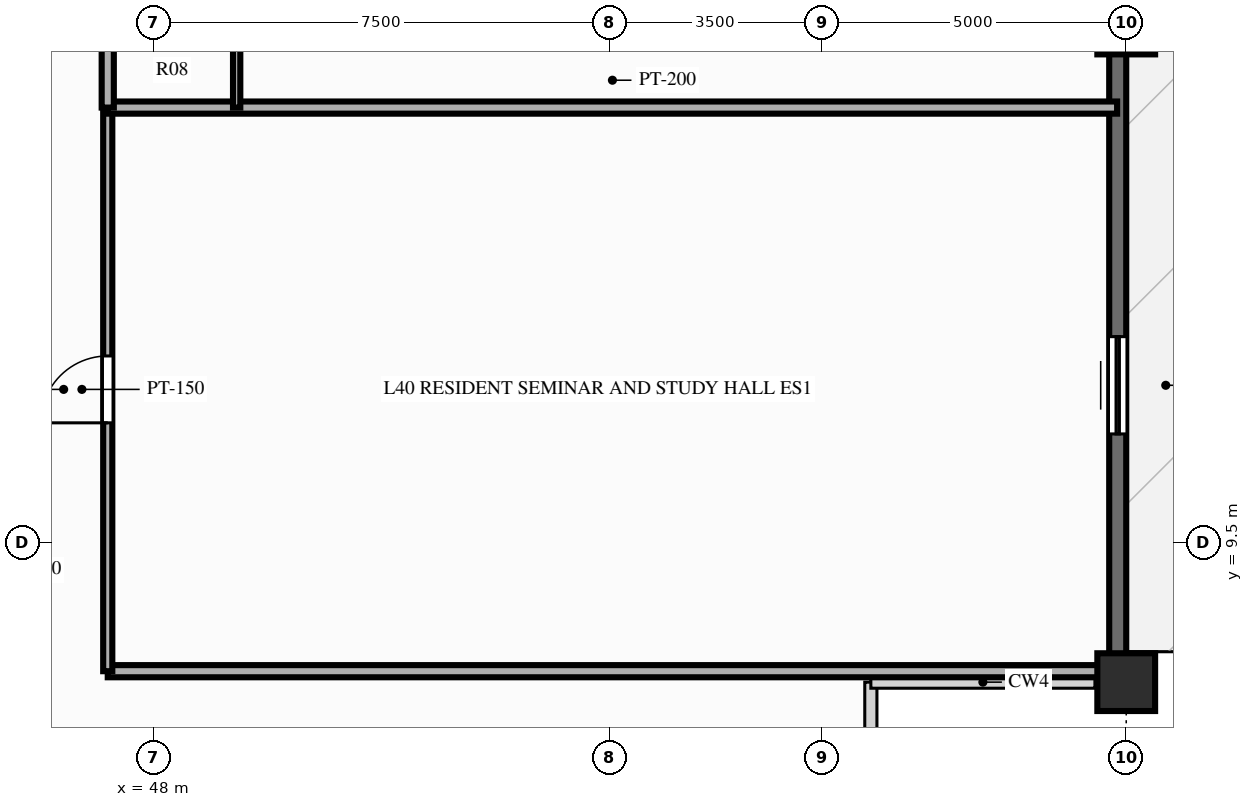
"""IFC4 building model, lengths in metres.
Left out: names, types, materials, properties, quantities, classifications, styles, units other than length and angle.
Written with IfcOpenShell. Run it as: python <this file> out.ifc"""

import sys

from ifc_helpers import new_model, si_unit, direction, frame, frame_2d, origin, origin_2d, place, context, subcontext, project, spatial, rectangle, extrude, source, transform, mapped, element, fill, save


model = new_model("IFC4")
c1 = context("Model", 3, precision=1e-05, world=origin(), true_north=direction((0.0, 1.0)))
c2 = subcontext(c1, "Body", "Model", "MODEL_VIEW")
j1 = project(units=[si_unit("LENGTHUNIT", "METRE"), si_unit("PLANEANGLEUNIT", "RADIAN")], contexts=[c1])
p1 = place(None, origin())
s1 = spatial("IfcSite", under=j1, at=p1, CompositionType="ELEMENT")
p2 = place(p1, origin())
s2 = spatial("IfcBuilding", under=s1, at=p2, CompositionType="ELEMENT")
p3 = place(p2, frame((0.0, 0.0, 126.75)))
s3 = spatial("IfcBuildingStorey", under=s2, at=p3, CompositionType="ELEMENT", Elevation=126.75)
m1 = source(origin(), c2, "Body", "SweptSolid", [
    extrude(rectangle(XDim=0.95, YDim=0.95, at=origin_2d()), origin(), (0.0, 0.0, 1.0), 3.0),
])
for number, where, z_axis, x_axis in (
    (1, (64.0, 7.2, 0.0), (0.0, 0.0, 1.0), (1.0, 0.0, 0.0)),
    (2, (64.0, 18.0, 0.0), (0.0, 0.0, 1.0), (1.0, 0.0, 0.0)),
):
    element("IfcColumn", number, at=place(p3, frame(where, z_axis=z_axis, x_axis=x_axis)), inside=s3, PredefinedType="COLUMN", context=c2, shape_type="MappedRepresentation", body=[
        mapped(m1, transform((0.0, 0.0, 0.0), scale=1.0)),
    ])
p4 = place(p3, frame((63.86, 7.2, 0.0), z_axis=(0.0, 0.0, 1.0), x_axis=(0.0, 1.0, 0.0)))
e3 = element("IfcWall", 3, at=p4, inside=s3, PredefinedType="SOLIDWALL", context=c2, shape_type="SweptSolid", body=[
    extrude(rectangle(XDim=39.6, YDim=0.28, at=frame_2d((19.8, 0.0))), origin(), (0.0, 0.0, 1.0), 2.28),
])
p5 = place(p4, frame((5.683, 0.0, 0.0), z_axis=(0.0, 0.0, 1.0), x_axis=(-1.0, 0.0, 0.0)))
e4 = element("IfcOpeningElement", 4, at=p5, cuts=e3, PredefinedType="OPENING", context=c2, shape_type="SweptSolid", body=[
    extrude(rectangle(XDim=1.6, YDim=2.15, at=frame_2d((0.8, 1.075))), frame((0.0, 0.152, 0.0), z_axis=(0.0, -1.0, 0.0), x_axis=(1.0, 0.0, 0.0)), (0.0, 0.0, 1.0), 0.304),
])
p6 = place(p4, frame((13.483, 0.0, 0.25)))
e5 = element("IfcOpeningElement", 5, at=p6, cuts=e3, PredefinedType="OPENING", context=c2, shape_type="SweptSolid", body=[
    extrude(rectangle(XDim=1.2, YDim=1.5, at=frame_2d((0.6, 0.75))), frame((0.0, 0.152, 0.0), z_axis=(0.0, -1.0, 0.0), x_axis=(1.0, 0.0, 0.0)), (0.0, 0.0, 1.0), 0.304),
])
p7 = place(p4, frame((16.82, 0.0, 0.25)))
e6 = element("IfcOpeningElement", 6, at=p7, cuts=e3, PredefinedType="OPENING", context=c2, shape_type="SweptSolid", body=[
    extrude(rectangle(XDim=1.2, YDim=1.5, at=frame_2d((0.6, 0.75))), frame((0.0, 0.152, 0.0), z_axis=(0.0, -1.0, 0.0), x_axis=(1.0, 0.0, 0.0)), (0.0, 0.0, 1.0), 0.304),
])
p8 = place(p4, frame((19.2, 0.0, 0.25)))
e7 = element("IfcOpeningElement", 7, at=p8, cuts=e3, PredefinedType="OPENING", context=c2, shape_type="SweptSolid", body=[
    extrude(rectangle(XDim=1.2, YDim=1.5, at=frame_2d((0.6, 0.75))), frame((0.0, 0.152, 0.0), z_axis=(0.0, -1.0, 0.0), x_axis=(1.0, 0.0, 0.0)), (0.0, 0.0, 1.0), 0.304),
])
p9 = place(p4, frame((21.582, 0.0, 0.25)))
e8 = element("IfcOpeningElement", 8, at=p9, cuts=e3, PredefinedType="OPENING", context=c2, shape_type="SweptSolid", body=[
    extrude(rectangle(XDim=1.2, YDim=1.5, at=frame_2d((0.6, 0.75))), frame((0.0, 0.152, 0.0), z_axis=(0.0, -1.0, 0.0), x_axis=(1.0, 0.0, 0.0)), (0.0, 0.0, 1.0), 0.304),
])
p10 = place(p4, frame((23.992, 0.0, 0.25)))
e9 = element("IfcOpeningElement", 9, at=p10, cuts=e3, PredefinedType="OPENING", context=c2, shape_type="SweptSolid", body=[
    extrude(rectangle(XDim=1.2, YDim=1.5, at=frame_2d((0.6, 0.75))), frame((0.0, 0.152, 0.0), z_axis=(0.0, -1.0, 0.0), x_axis=(1.0, 0.0, 0.0)), (0.0, 0.0, 1.0), 0.304),
])
p11 = place(p4, frame((26.493, 0.0, 0.25)))
e10 = element("IfcOpeningElement", 10, at=p11, cuts=e3, PredefinedType="OPENING", context=c2, shape_type="SweptSolid", body=[
    extrude(rectangle(XDim=1.2, YDim=1.5, at=frame_2d((0.6, 0.75))), frame((0.0, 0.152, 0.0), z_axis=(0.0, -1.0, 0.0), x_axis=(1.0, 0.0, 0.0)), (0.0, 0.0, 1.0), 0.304),
])
p12 = place(p4, frame((29.468, 0.0, 0.25)))
e11 = element("IfcOpeningElement", 11, at=p12, cuts=e3, PredefinedType="OPENING", context=c2, shape_type="SweptSolid", body=[
    extrude(rectangle(XDim=0.7, YDim=1.5, at=frame_2d((0.35, 0.75))), frame((0.0, 0.152, 0.0), z_axis=(0.0, -1.0, 0.0), x_axis=(1.0, 0.0, 0.0)), (0.0, 0.0, 1.0), 0.304),
])
p13 = place(p4, frame((30.996, 0.0, 0.25)))
e12 = element("IfcOpeningElement", 12, at=p13, cuts=e3, PredefinedType="OPENING", context=c2, shape_type="SweptSolid", body=[
    extrude(rectangle(XDim=1.2, YDim=1.5, at=frame_2d((0.6, 0.75))), frame((0.0, 0.152, 0.0), z_axis=(0.0, -1.0, 0.0), x_axis=(1.0, 0.0, 0.0)), (0.0, 0.0, 1.0), 0.304),
])
p14 = place(p4, frame((33.221, 0.0, 0.25)))
e13 = element("IfcOpeningElement", 13, at=p14, cuts=e3, PredefinedType="OPENING", context=c2, shape_type="SweptSolid", body=[
    extrude(rectangle(XDim=1.2, YDim=1.5, at=frame_2d((0.6, 0.75))), frame((0.0, 0.152, 0.0), z_axis=(0.0, -1.0, 0.0), x_axis=(1.0, 0.0, 0.0)), (0.0, 0.0, 1.0), 0.304),
])
p15 = place(p4, frame((36.528, 0.0, 0.25)))
e14 = element("IfcOpeningElement", 14, at=p15, cuts=e3, PredefinedType="OPENING", context=c2, shape_type="SweptSolid", body=[
    extrude(rectangle(XDim=1.2, YDim=1.5, at=frame_2d((0.6, 0.75))), frame((0.0, 0.152, 0.0), z_axis=(0.0, -1.0, 0.0), x_axis=(1.0, 0.0, 0.0)), (0.0, 0.0, 1.0), 0.304),
])
p16 = place(p3, frame((47.25, 7.38, 0.0), z_axis=(0.0, 0.0, 1.0), x_axis=(1.0, 0.0, 0.0)))
e15 = element("IfcWall", 15, at=p16, inside=s3, PredefinedType="PARTITIONING", context=c2, shape_type="SweptSolid", body=[
    extrude(rectangle(XDim=16.6, YDim=0.2, at=frame_2d((8.3, 0.0))), origin(), (0.0, 0.0, 1.0), 2.79),
])
p17 = place(p3, frame((47.25, 7.38, 0.0), z_axis=(0.0, 0.0, 1.0), x_axis=(0.0, 1.0, 0.0)))
e16 = element("IfcWall", 16, at=p17, inside=s3, PredefinedType="PARTITIONING", context=c2, shape_type="SweptSolid", body=[
    extrude(rectangle(XDim=9.27, YDim=0.15, at=frame_2d((4.635, 0.0))), origin(), (0.0, 0.0, 1.0), 2.79),
])
p18 = place(p17, frame((4.085, 0.0, 0.0)))
e17 = element("IfcOpeningElement", 17, at=p18, cuts=e16, PredefinedType="OPENING", context=c2, shape_type="SweptSolid", body=[
    extrude(rectangle(XDim=1.1, YDim=2.15, at=frame_2d((0.55, 1.075))), frame((0.0, 0.087, 0.0), z_axis=(0.0, -1.0, 0.0), x_axis=(1.0, 0.0, 0.0)), (0.0, 0.0, 1.0), 0.174),
])
p19 = place(p3, frame((47.25, 16.65, 0.0), z_axis=(0.0, 0.0, 1.0), x_axis=(1.0, 0.0, 0.0)))
e18 = element("IfcWall", 18, at=p19, inside=s3, PredefinedType="PARTITIONING", context=c2, shape_type="SweptSolid", body=[
    extrude(rectangle(XDim=16.6, YDim=0.2, at=frame_2d((8.3, 0.0))), origin(), (0.0, 0.0, 1.0), 2.79),
])
p20 = place(p3, frame((47.25, 16.65, 0.0), z_axis=(0.0, 0.0, 1.0), x_axis=(0.0, 1.0, 0.0)))
e19 = element("IfcWall", 19, at=p20, inside=s3, PredefinedType="PARTITIONING", context=c2, shape_type="SweptSolid", body=[
    extrude(rectangle(XDim=2.596, YDim=0.2, at=frame_2d((1.298, 0.0))), origin(), (0.0, 0.0, 1.0), 2.79),
])
p21 = place(p3, frame((49.37, 16.65, 0.0), z_axis=(0.0, 0.0, 1.0), x_axis=(0.0, 1.0, 0.0)))
e20 = element("IfcWall", 20, at=p21, inside=s3, PredefinedType="PARTITIONING", context=c2, shape_type="SweptSolid", body=[
    extrude(rectangle(XDim=2.596, YDim=0.12, at=frame_2d((1.298, 0.0))), origin(), (0.0, 0.0, 1.0), 2.79),
])
m2 = source(origin(), c2, "Body", "SweptSolid", [
    extrude(rectangle(XDim=1.6, YDim=2.15, at=frame_2d((0.8, 1.075))), frame((0.0, 0.025, 0.0), z_axis=(0.0, -1.0, 0.0), x_axis=(1.0, 0.0, 0.0)), (0.0, 0.0, 1.0), 0.05),
])
p22 = place(p5, origin())
e21 = element("IfcDoor", 21, at=p22, inside=s3, OperationType="SLIDING_TO_LEFT", PredefinedType="DOOR", context=c2, shape_type="MappedRepresentation", body=[
    mapped(m2, transform((0.0, 0.0, 0.0), scale=1.0)),
])
fill(e4, e21)
m3 = source(origin(), c2, "Body", "SweptSolid", [
    extrude(rectangle(XDim=1.1, YDim=2.15, at=frame_2d((0.55, 1.075))), frame((0.0, 0.025, 0.0), z_axis=(0.0, -1.0, 0.0), x_axis=(1.0, 0.0, 0.0)), (0.0, 0.0, 1.0), 0.05),
])
p23 = place(p18, origin())
e22 = element("IfcDoor", 22, at=p23, inside=s3, OperationType="SINGLE_SWING_LEFT", PredefinedType="DOOR", context=c2, shape_type="MappedRepresentation", body=[
    mapped(m3, transform((0.0, 0.0, 0.0), scale=1.0)),
])
fill(e17, e22)
save(model, sys.argv[1])
